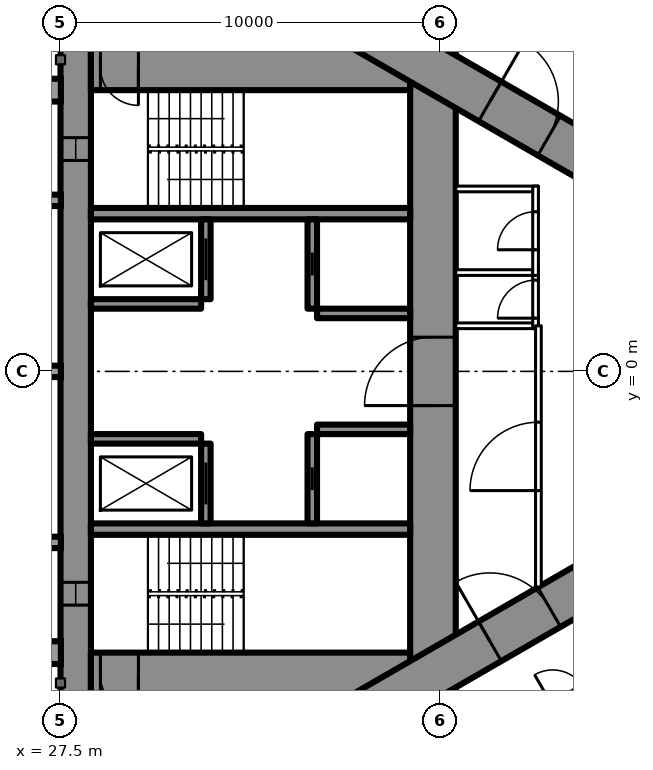
"""IFC4 building model, lengths in metres.
Left out: names, types, materials, properties, quantities, classifications, styles, units other than length and angle.
Written with IfcOpenShell. Run it as: python <this file> out.ifc"""

import sys

from ifc_helpers import new_model, si_unit, direction, frame, frame_2d, origin, place, context, subcontext, project, spatial, rectangle, extrude, element, fill, save


model = new_model("IFC4")
c1 = context("Model", 3, precision=1e-05, world=origin(), true_north=direction((0.0, 1.0)))
c2 = subcontext(c1, "Body", "Model", "MODEL_VIEW")
j1 = project(units=[si_unit("LENGTHUNIT", "METRE"), si_unit("PLANEANGLEUNIT", "RADIAN")], contexts=[c1])
p1 = place(None, origin())
s1 = spatial("IfcSite", under=j1, at=p1, CompositionType="ELEMENT")
p2 = place(p1, origin())
s2 = spatial("IfcBuilding", under=s1, at=p2, CompositionType="ELEMENT")
p3 = place(p2, frame((0.0, 0.0, 28.5)))
s3 = spatial("IfcBuildingStorey", under=s2, at=p3, CompositionType="ELEMENT", Elevation=28.5)
p4 = place(p3, frame((27.9, -8.6, 0.0), z_axis=(0.0, 0.0, 1.0), x_axis=(0.0, 1.0, 0.0)))
e1 = element("IfcWall", 1, at=p4, inside=s3, PredefinedType="SHEAR", context=c2, shape_type="SweptSolid", body=[
    extrude(rectangle(XDim=17.2, YDim=0.8, at=frame_2d((8.6, 0.0))), origin(), (0.0, 0.0, 1.0), 3.5),
])
p5 = place(p4, frame((2.45, 0.0, 0.6)))
e2 = element("IfcOpeningElement", 2, at=p5, cuts=e1, PredefinedType="OPENING", context=c2, shape_type="SweptSolid", body=[
    extrude(rectangle(XDim=0.6, YDim=2.1, at=frame_2d((0.3, 1.05))), frame((0.0, 0.41, 0.0), z_axis=(0.0, -1.0, 0.0), x_axis=(1.0, 0.0, 0.0)), (0.0, 0.0, 1.0), 0.82),
])
p6 = place(p4, frame((14.15, 0.0, 0.6)))
e3 = element("IfcOpeningElement", 3, at=p6, cuts=e1, PredefinedType="OPENING", context=c2, shape_type="SweptSolid", body=[
    extrude(rectangle(XDim=0.6, YDim=2.1, at=frame_2d((0.3, 1.05))), frame((0.0, 0.41, 0.0), z_axis=(0.0, -1.0, 0.0), x_axis=(1.0, 0.0, 0.0)), (0.0, 0.0, 1.0), 0.82),
])
p7 = place(p3, frame((37.3, -8.6, 0.0), z_axis=(0.0, 0.0, 1.0), x_axis=(0.0, 1.0, 0.0)))
e4 = element("IfcWall", 4, at=p7, inside=s3, PredefinedType="SHEAR", context=c2, shape_type="SweptSolid", body=[
    extrude(rectangle(XDim=17.2, YDim=1.2, at=frame_2d((8.6, 0.0))), origin(), (0.0, 0.0, 1.0), 3.5),
])
p8 = place(p7, frame((7.7, 0.0, 0.0)))
e5 = element("IfcOpeningElement", 5, at=p8, cuts=e4, PredefinedType="OPENING", context=c2, shape_type="SweptSolid", body=[
    extrude(rectangle(XDim=1.8, YDim=2.2, at=frame_2d((0.9, 1.1))), frame((0.0, 0.61, 0.0), z_axis=(0.0, -1.0, 0.0), x_axis=(1.0, 0.0, 0.0)), (0.0, 0.0, 1.0), 1.22),
])
p9 = place(p3, frame((28.3, -8.0, 0.0), z_axis=(0.0, 0.0, 1.0), x_axis=(1.0, 0.0, 0.0)))
e6 = element("IfcWall", 6, at=p9, inside=s3, PredefinedType="SHEAR", context=c2, shape_type="SweptSolid", body=[
    extrude(rectangle(XDim=8.4, YDim=1.2, at=frame_2d((4.2, 0.0))), origin(), (0.0, 0.0, 1.0), 3.5),
])
p10 = place(p9, frame((0.25, 0.0, 0.0)))
e7 = element("IfcOpeningElement", 7, at=p10, cuts=e6, PredefinedType="OPENING", context=c2, shape_type="SweptSolid", body=[
    extrude(rectangle(XDim=1.0, YDim=2.2, at=frame_2d((0.5, 1.1))), frame((0.0, 0.61, 0.0), z_axis=(0.0, -1.0, 0.0), x_axis=(1.0, 0.0, 0.0)), (0.0, 0.0, 1.0), 1.22),
])
p11 = place(p3, frame((28.3, 8.0, 0.0), z_axis=(0.0, 0.0, 1.0), x_axis=(1.0, 0.0, 0.0)))
e8 = element("IfcWall", 8, at=p11, inside=s3, PredefinedType="SHEAR", context=c2, shape_type="SweptSolid", body=[
    extrude(rectangle(XDim=8.4, YDim=1.2, at=frame_2d((4.2, 0.0))), origin(), (0.0, 0.0, 1.0), 3.5),
])
p12 = place(p11, frame((0.25, 0.0, 0.0)))
e9 = element("IfcOpeningElement", 9, at=p12, cuts=e8, PredefinedType="OPENING", context=c2, shape_type="SweptSolid", body=[
    extrude(rectangle(XDim=1.0, YDim=2.2, at=frame_2d((0.5, 1.1))), frame((0.0, 0.61, 0.0), z_axis=(0.0, -1.0, 0.0), x_axis=(1.0, 0.0, 0.0)), (0.0, 0.0, 1.0), 1.22),
])
for number, where, z_axis, x_axis in (
    (10, (28.3, -4.15, 0.0), (0.0, 0.0, 1.0), (1.0, 0.0, 0.0)),
    (11, (28.3, 4.15, 0.0), (0.0, 0.0, 1.0), (1.0, 0.0, 0.0)),
):
    element("IfcWall", number, at=place(p3, frame(where, z_axis=z_axis, x_axis=x_axis)), inside=s3, PredefinedType="SHEAR", context=c2, shape_type="SweptSolid", body=[
        extrude(rectangle(XDim=8.4, YDim=0.3, at=frame_2d((4.2, 0.0))), origin(), (0.0, 0.0, 1.0), 3.5),
    ])
p13 = place(p3, frame((31.325, -4.0, 0.0), z_axis=(0.0, 0.0, 1.0), x_axis=(0.0, 1.0, 0.0)))
e12 = element("IfcWall", 12, at=p13, inside=s3, PredefinedType="SHEAR", context=c2, shape_type="SweptSolid", body=[
    extrude(rectangle(XDim=2.1, YDim=0.25, at=frame_2d((1.05, 0.0))), origin(), (0.0, 0.0, 1.0), 3.5),
])
p14 = place(p13, frame((0.5, 0.0, 0.0)))
e13 = element("IfcOpeningElement", 13, at=p14, cuts=e12, PredefinedType="OPENING", context=c2, shape_type="SweptSolid", body=[
    extrude(rectangle(XDim=1.1, YDim=2.2, at=frame_2d((0.55, 1.1))), frame((0.0, 0.135, 0.0), z_axis=(0.0, -1.0, 0.0), x_axis=(1.0, 0.0, 0.0)), (0.0, 0.0, 1.0), 0.27),
])
p15 = place(p3, frame((34.125, -4.0, 0.0), z_axis=(0.0, 0.0, 1.0), x_axis=(0.0, 1.0, 0.0)))
e14 = element("IfcWall", 14, at=p15, inside=s3, PredefinedType="SHEAR", context=c2, shape_type="SweptSolid", body=[
    extrude(rectangle(XDim=2.35, YDim=0.25, at=frame_2d((1.175, 0.0))), origin(), (0.0, 0.0, 1.0), 3.5),
])
p16 = place(p15, frame((0.875, 0.0, 0.0)))
e15 = element("IfcOpeningElement", 15, at=p16, cuts=e14, PredefinedType="OPENING", context=c2, shape_type="SweptSolid", body=[
    extrude(rectangle(XDim=0.6, YDim=2.0, at=frame_2d((0.3, 1.0))), frame((0.0, 0.135, 0.0), z_axis=(0.0, -1.0, 0.0), x_axis=(1.0, 0.0, 0.0)), (0.0, 0.0, 1.0), 0.27),
])
p17 = place(p3, frame((28.3, -1.775, 0.0), z_axis=(0.0, 0.0, 1.0), x_axis=(1.0, 0.0, 0.0)))
e16 = element("IfcWall", 16, at=p17, inside=s3, PredefinedType="SHEAR", context=c2, shape_type="SweptSolid", body=[
    extrude(rectangle(XDim=2.9, YDim=0.25, at=frame_2d((1.45, 0.0))), origin(), (0.0, 0.0, 1.0), 3.5),
])
p18 = place(p3, frame((34.25, -1.525, 0.0), z_axis=(0.0, 0.0, 1.0), x_axis=(1.0, 0.0, 0.0)))
e17 = element("IfcWall", 17, at=p18, inside=s3, PredefinedType="SHEAR", context=c2, shape_type="SweptSolid", body=[
    extrude(rectangle(XDim=2.45, YDim=0.25, at=frame_2d((1.225, 0.0))), origin(), (0.0, 0.0, 1.0), 3.5),
])
p19 = place(p3, frame((31.325, 1.9, 0.0), z_axis=(0.0, 0.0, 1.0), x_axis=(0.0, 1.0, 0.0)))
e18 = element("IfcWall", 18, at=p19, inside=s3, PredefinedType="SHEAR", context=c2, shape_type="SweptSolid", body=[
    extrude(rectangle(XDim=2.1, YDim=0.25, at=frame_2d((1.05, 0.0))), origin(), (0.0, 0.0, 1.0), 3.5),
])
p20 = place(p19, frame((0.5, 0.0, 0.0)))
e19 = element("IfcOpeningElement", 19, at=p20, cuts=e18, PredefinedType="OPENING", context=c2, shape_type="SweptSolid", body=[
    extrude(rectangle(XDim=1.1, YDim=2.2, at=frame_2d((0.55, 1.1))), frame((0.0, 0.135, 0.0), z_axis=(0.0, -1.0, 0.0), x_axis=(1.0, 0.0, 0.0)), (0.0, 0.0, 1.0), 0.27),
])
p21 = place(p3, frame((34.125, 1.65, 0.0), z_axis=(0.0, 0.0, 1.0), x_axis=(0.0, 1.0, 0.0)))
e20 = element("IfcWall", 20, at=p21, inside=s3, PredefinedType="SHEAR", context=c2, shape_type="SweptSolid", body=[
    extrude(rectangle(XDim=2.35, YDim=0.25, at=frame_2d((1.175, 0.0))), origin(), (0.0, 0.0, 1.0), 3.5),
])
p22 = place(p21, frame((0.875, 0.0, 0.0)))
e21 = element("IfcOpeningElement", 21, at=p22, cuts=e20, PredefinedType="OPENING", context=c2, shape_type="SweptSolid", body=[
    extrude(rectangle(XDim=0.6, YDim=2.0, at=frame_2d((0.3, 1.0))), frame((0.0, 0.135, 0.0), z_axis=(0.0, -1.0, 0.0), x_axis=(1.0, 0.0, 0.0)), (0.0, 0.0, 1.0), 0.27),
])
p23 = place(p3, frame((28.3, 1.775, 0.0), z_axis=(0.0, 0.0, 1.0), x_axis=(1.0, 0.0, 0.0)))
e22 = element("IfcWall", 22, at=p23, inside=s3, PredefinedType="SHEAR", context=c2, shape_type="SweptSolid", body=[
    extrude(rectangle(XDim=2.9, YDim=0.25, at=frame_2d((1.45, 0.0))), origin(), (0.0, 0.0, 1.0), 3.5),
])
p24 = place(p3, frame((34.25, 1.525, 0.0), z_axis=(0.0, 0.0, 1.0), x_axis=(1.0, 0.0, 0.0)))
e23 = element("IfcWall", 23, at=p24, inside=s3, PredefinedType="SHEAR", context=c2, shape_type="SweptSolid", body=[
    extrude(rectangle(XDim=2.45, YDim=0.25, at=frame_2d((1.225, 0.0))), origin(), (0.0, 0.0, 1.0), 3.5),
])
p25 = place(p3, frame((27.2, -13.8, 0.0), z_axis=(0.0, 0.0, 1.0), x_axis=(0.866027159892, 0.499996958321, 0.0)))
e24 = element("IfcWall", 24, at=p25, inside=s3, PredefinedType="SHEAR", context=c2, shape_type="SweptSolid", body=[
    extrude(rectangle(XDim=27.947, YDim=1.2, at=frame_2d((13.973, 0.0))), origin(), (0.0, 0.0, 1.0), 3.5),
])
p26 = place(p25, frame((4.6, 0.0, 0.0)))
e25 = element("IfcOpeningElement", 25, at=p26, cuts=e24, PredefinedType="OPENING", context=c2, shape_type="SweptSolid", body=[
    extrude(rectangle(XDim=1.0, YDim=2.2, at=frame_2d((0.5, 1.1))), frame((0.0, 0.61, 0.0), z_axis=(0.0, -1.0, 0.0), x_axis=(1.0, 0.0, 0.0)), (0.0, 0.0, 1.0), 1.22),
])
p27 = place(p25, frame((13.395, 0.0, 0.0)))
e26 = element("IfcOpeningElement", 26, at=p27, cuts=e24, PredefinedType="OPENING", context=c2, shape_type="SweptSolid", body=[
    extrude(rectangle(XDim=1.8, YDim=2.2, at=frame_2d((0.9, 1.1))), frame((0.0, 0.61, 0.0), z_axis=(0.0, -1.0, 0.0), x_axis=(1.0, 0.0, 0.0)), (0.0, 0.0, 1.0), 1.22),
])
p28 = place(p3, frame((27.2, 13.8, 0.0), z_axis=(0.0, 0.0, 1.0), x_axis=(0.866024515034, -0.500001539357, 0.0)))
e27 = element("IfcWall", 27, at=p28, inside=s3, PredefinedType="SHEAR", context=c2, shape_type="SweptSolid", body=[
    extrude(rectangle(XDim=26.907, YDim=1.2, at=frame_2d((13.454, 0.0))), origin(), (0.0, 0.0, 1.0), 3.5),
])
p29 = place(p28, frame((4.6, 0.0, 0.0)))
e28 = element("IfcOpeningElement", 28, at=p29, cuts=e27, PredefinedType="OPENING", context=c2, shape_type="SweptSolid", body=[
    extrude(rectangle(XDim=1.0, YDim=2.2, at=frame_2d((0.5, 1.1))), frame((0.0, 0.61, 0.0), z_axis=(0.0, -1.0, 0.0), x_axis=(1.0, 0.0, 0.0)), (0.0, 0.0, 1.0), 1.22),
])
p30 = place(p28, frame((13.395, 0.0, 0.0)))
e29 = element("IfcOpeningElement", 29, at=p30, cuts=e27, PredefinedType="OPENING", context=c2, shape_type="SweptSolid", body=[
    extrude(rectangle(XDim=1.8, YDim=2.2, at=frame_2d((0.9, 1.1))), frame((0.0, 0.61, 0.0), z_axis=(0.0, -1.0, 0.0), x_axis=(1.0, 0.0, 0.0)), (0.0, 0.0, 1.0), 1.22),
])
p31 = place(p3, frame((37.96, -10.243, 0.0), z_axis=(0.0, 0.0, 1.0), x_axis=(0.866026429433, 0.499998223521, 0.0)))
e30 = element("IfcWall", 30, at=p31, inside=s3, PredefinedType="PARTITIONING", context=c2, shape_type="SweptSolid", body=[
    extrude(rectangle(XDim=20.487, YDim=0.2, at=frame_2d((10.243, 0.0))), origin(), (0.0, 0.0, 1.0), 3.25),
])
p32 = place(p31, frame((4.575, 0.0, 0.0)))
e31 = element("IfcOpeningElement", 31, at=p32, cuts=e30, PredefinedType="OPENING", context=c2, shape_type="SweptSolid", body=[
    extrude(rectangle(XDim=0.95, YDim=2.2, at=frame_2d((0.475, 1.1))), frame((0.0, 0.11, 0.0), z_axis=(0.0, -1.0, 0.0), x_axis=(1.0, 0.0, 0.0)), (0.0, 0.0, 1.0), 0.22),
])
p33 = place(p31, frame((9.199, 0.0, 0.0)))
e32 = element("IfcOpeningElement", 32, at=p33, cuts=e30, PredefinedType="OPENING", context=c2, shape_type="SweptSolid", body=[
    extrude(rectangle(XDim=0.95, YDim=2.2, at=frame_2d((0.475, 1.1))), frame((0.0, 0.11, 0.0), z_axis=(0.0, -1.0, 0.0), x_axis=(1.0, 0.0, 0.0)), (0.0, 0.0, 1.0), 0.22),
])
p34 = place(p31, frame((15.599, 0.0, 0.0)))
e33 = element("IfcOpeningElement", 33, at=p34, cuts=e30, PredefinedType="OPENING", context=c2, shape_type="SweptSolid", body=[
    extrude(rectangle(XDim=0.95, YDim=2.2, at=frame_2d((0.475, 1.1))), frame((0.0, 0.11, 0.0), z_axis=(0.0, -1.0, 0.0), x_axis=(1.0, 0.0, 0.0)), (0.0, 0.0, 1.0), 0.22),
])
p35 = place(p31, frame((2.875, 0.0, 0.0)))
e34 = element("IfcOpeningElement", 34, at=p35, cuts=e30, PredefinedType="OPENING", context=c2, shape_type="SweptSolid", body=[
    extrude(rectangle(XDim=0.95, YDim=2.2, at=frame_2d((0.475, 1.1))), frame((0.0, 0.11, 0.0), z_axis=(0.0, -1.0, 0.0), x_axis=(1.0, 0.0, 0.0)), (0.0, 0.0, 1.0), 0.22),
])
for number, where, z_axis, x_axis in (
    (35, (37.9, 1.2, 0.0), (0.0, 0.0, 1.0), (1.0, 0.0, 0.0)),
    (36, (37.9, 2.6, 0.0), (0.0, 0.0, 1.0), (1.0, 0.0, 0.0)),
    (37, (37.9, 4.8, 0.0), (0.0, 0.0, 1.0), (1.0, 0.0, 0.0)),
):
    element("IfcWall", number, at=place(p3, frame(where, z_axis=z_axis, x_axis=x_axis)), inside=s3, PredefinedType="PARTITIONING", context=c2, shape_type="SweptSolid", body=[
        extrude(rectangle(XDim=2.175, YDim=0.15, at=frame_2d((1.087, 0.0))), origin(), (0.0, 0.0, 1.0), 3.25),
    ])
p36 = place(p3, frame((40.0, 1.125, 0.0), z_axis=(0.0, 0.0, 1.0), x_axis=(0.0, 1.0, 0.0)))
e38 = element("IfcWall", 38, at=p36, inside=s3, PredefinedType="PARTITIONING", context=c2, shape_type="SweptSolid", body=[
    extrude(rectangle(XDim=1.55, YDim=0.15, at=frame_2d((0.775, 0.0))), origin(), (0.0, 0.0, 1.0), 3.25),
])
p37 = place(p36, frame((0.275, 0.0, 0.0)))
e39 = element("IfcOpeningElement", 39, at=p37, cuts=e38, PredefinedType="OPENING", context=c2, shape_type="SweptSolid", body=[
    extrude(rectangle(XDim=1.0, YDim=2.2, at=frame_2d((0.5, 1.1))), frame((0.0, 0.085, 0.0), z_axis=(0.0, -1.0, 0.0), x_axis=(1.0, 0.0, 0.0)), (0.0, 0.0, 1.0), 0.17),
])
p38 = place(p3, frame((40.0, 2.525, 0.0), z_axis=(0.0, 0.0, 1.0), x_axis=(0.0, 1.0, 0.0)))
e40 = element("IfcWall", 40, at=p38, inside=s3, PredefinedType="PARTITIONING", context=c2, shape_type="SweptSolid", body=[
    extrude(rectangle(XDim=2.35, YDim=0.15, at=frame_2d((1.175, 0.0))), origin(), (0.0, 0.0, 1.0), 3.25),
])
p39 = place(p38, frame((0.675, 0.0, 0.0)))
e41 = element("IfcOpeningElement", 41, at=p39, cuts=e40, PredefinedType="OPENING", context=c2, shape_type="SweptSolid", body=[
    extrude(rectangle(XDim=1.0, YDim=2.2, at=frame_2d((0.5, 1.1))), frame((0.0, 0.085, 0.0), z_axis=(0.0, -1.0, 0.0), x_axis=(1.0, 0.0, 0.0)), (0.0, 0.0, 1.0), 0.17),
])
p40 = place(p3, frame((40.075, -5.674, 0.0), z_axis=(0.0, 0.0, 1.0), x_axis=(0.0, 1.0, 0.0)))
e42 = element("IfcWall", 42, at=p40, inside=s3, PredefinedType="PARTITIONING", context=c2, shape_type="SweptSolid", body=[
    extrude(rectangle(XDim=6.874, YDim=0.15, at=frame_2d((3.437, 0.0))), origin(), (0.0, 0.0, 1.0), 3.25),
])
p41 = place(p40, frame((2.537, 0.0, 0.0)))
e43 = element("IfcOpeningElement", 43, at=p41, cuts=e42, PredefinedType="OPENING", context=c2, shape_type="SweptSolid", body=[
    extrude(rectangle(XDim=1.8, YDim=2.2, at=frame_2d((0.9, 1.1))), frame((0.0, 0.085, 0.0), z_axis=(0.0, -1.0, 0.0), x_axis=(1.0, 0.0, 0.0)), (0.0, 0.0, 1.0), 0.17),
])
p42 = place(p35, origin())
e44 = element("IfcDoor", 44, at=p42, inside=s3, OperationType="SINGLE_SWING_LEFT", PredefinedType="DOOR", context=c2, shape_type="SweptSolid", body=[
    extrude(rectangle(XDim=0.95, YDim=2.2, at=frame_2d((0.475, 1.1))), frame((0.0, 0.025, 0.0), z_axis=(0.0, -1.0, 0.0), x_axis=(1.0, 0.0, 0.0)), (0.0, 0.0, 1.0), 0.05),
])
fill(e34, e44)
p43 = place(p37, origin())
e45 = element("IfcDoor", 45, at=p43, inside=s3, OperationType="SINGLE_SWING_LEFT", PredefinedType="DOOR", context=c2, shape_type="SweptSolid", body=[
    extrude(rectangle(XDim=1.0, YDim=2.2, at=frame_2d((0.5, 1.1))), frame((0.0, 0.025, 0.0), z_axis=(0.0, -1.0, 0.0), x_axis=(1.0, 0.0, 0.0)), (0.0, 0.0, 1.0), 0.05),
])
fill(e39, e45)
p44 = place(p39, origin())
e46 = element("IfcDoor", 46, at=p44, inside=s3, OperationType="SINGLE_SWING_LEFT", PredefinedType="DOOR", context=c2, shape_type="SweptSolid", body=[
    extrude(rectangle(XDim=1.0, YDim=2.2, at=frame_2d((0.5, 1.1))), frame((0.0, 0.025, 0.0), z_axis=(0.0, -1.0, 0.0), x_axis=(1.0, 0.0, 0.0)), (0.0, 0.0, 1.0), 0.05),
])
fill(e41, e46)
p45 = place(p41, origin())
e47 = element("IfcDoor", 47, at=p45, inside=s3, OperationType="DOUBLE_DOOR_SINGLE_SWING", PredefinedType="DOOR", context=c2, shape_type="SweptSolid", body=[
    extrude(rectangle(XDim=1.8, YDim=2.2, at=frame_2d((0.9, 1.1))), frame((0.0, 0.025, 0.0), z_axis=(0.0, -1.0, 0.0), x_axis=(1.0, 0.0, 0.0)), (0.0, 0.0, 1.0), 0.05),
])
fill(e43, e47)
p46 = place(p27, origin())
e48 = element("IfcDoor", 48, at=p46, inside=s3, OperationType="DOUBLE_DOOR_SINGLE_SWING", PredefinedType="DOOR", context=c2, shape_type="SweptSolid", body=[
    extrude(rectangle(XDim=1.8, YDim=2.2, at=frame_2d((0.9, 1.1))), frame((0.0, 0.025, 0.0), z_axis=(0.0, -1.0, 0.0), x_axis=(1.0, 0.0, 0.0)), (0.0, 0.0, 1.0), 0.05),
])
fill(e26, e48)
p47 = place(p30, origin())
e49 = element("IfcDoor", 49, at=p47, inside=s3, OperationType="DOUBLE_DOOR_SINGLE_SWING", PredefinedType="DOOR", context=c2, shape_type="SweptSolid", body=[
    extrude(rectangle(XDim=1.8, YDim=2.2, at=frame_2d((0.9, 1.1))), frame((0.0, 0.025, 0.0), z_axis=(0.0, -1.0, 0.0), x_axis=(1.0, 0.0, 0.0)), (0.0, 0.0, 1.0), 0.05),
])
fill(e29, e49)
p48 = place(p8, origin())
e50 = element("IfcDoor", 50, at=p48, inside=s3, OperationType="DOUBLE_DOOR_SINGLE_SWING", PredefinedType="DOOR", context=c2, shape_type="SweptSolid", body=[
    extrude(rectangle(XDim=1.8, YDim=2.2, at=frame_2d((0.9, 1.1))), frame((0.0, 0.025, 0.0), z_axis=(0.0, -1.0, 0.0), x_axis=(1.0, 0.0, 0.0)), (0.0, 0.0, 1.0), 0.05),
])
fill(e5, e50)
p49 = place(p10, origin())
e51 = element("IfcDoor", 51, at=p49, inside=s3, OperationType="SINGLE_SWING_RIGHT", PredefinedType="DOOR", context=c2, shape_type="SweptSolid", body=[
    extrude(rectangle(XDim=1.0, YDim=2.2, at=frame_2d((0.5, 1.1))), frame((0.0, 0.025, 0.0), z_axis=(0.0, -1.0, 0.0), x_axis=(1.0, 0.0, 0.0)), (0.0, 0.0, 1.0), 0.05),
])
fill(e7, e51)
p50 = place(p12, origin())
e52 = element("IfcDoor", 52, at=p50, inside=s3, OperationType="SINGLE_SWING_RIGHT", PredefinedType="DOOR", context=c2, shape_type="SweptSolid", body=[
    extrude(rectangle(XDim=1.0, YDim=2.2, at=frame_2d((0.5, 1.1))), frame((0.0, 0.025, 0.0), z_axis=(0.0, -1.0, 0.0), x_axis=(1.0, 0.0, 0.0)), (0.0, 0.0, 1.0), 0.05),
])
fill(e9, e52)
p51 = place(p14, origin())
e53 = element("IfcDoor", 53, at=p51, inside=s3, OperationType="SLIDING_TO_LEFT", PredefinedType="USERDEFINED", context=c2, shape_type="SweptSolid", body=[
    extrude(rectangle(XDim=1.1, YDim=2.2, at=frame_2d((0.55, 1.1))), frame((0.0, 0.025, 0.0), z_axis=(0.0, -1.0, 0.0), x_axis=(1.0, 0.0, 0.0)), (0.0, 0.0, 1.0), 0.05),
])
fill(e13, e53)
p52 = place(p20, origin())
e54 = element("IfcDoor", 54, at=p52, inside=s3, OperationType="SLIDING_TO_LEFT", PredefinedType="USERDEFINED", context=c2, shape_type="SweptSolid", body=[
    extrude(rectangle(XDim=1.1, YDim=2.2, at=frame_2d((0.55, 1.1))), frame((0.0, 0.025, 0.0), z_axis=(0.0, -1.0, 0.0), x_axis=(1.0, 0.0, 0.0)), (0.0, 0.0, 1.0), 0.05),
])
fill(e19, e54)
p53 = place(p16, origin())
e55 = element("IfcDoor", 55, at=p53, inside=s3, OperationType="SLIDING_TO_LEFT", PredefinedType="DOOR", context=c2, shape_type="SweptSolid", body=[
    extrude(rectangle(XDim=0.6, YDim=2.0, at=frame_2d((0.3, 1.0))), frame((0.0, 0.025, 0.0), z_axis=(0.0, -1.0, 0.0), x_axis=(1.0, 0.0, 0.0)), (0.0, 0.0, 1.0), 0.05),
])
fill(e15, e55)
p54 = place(p22, origin())
e56 = element("IfcDoor", 56, at=p54, inside=s3, OperationType="SLIDING_TO_LEFT", PredefinedType="DOOR", context=c2, shape_type="SweptSolid", body=[
    extrude(rectangle(XDim=0.6, YDim=2.0, at=frame_2d((0.3, 1.0))), frame((0.0, 0.025, 0.0), z_axis=(0.0, -1.0, 0.0), x_axis=(1.0, 0.0, 0.0)), (0.0, 0.0, 1.0), 0.05),
])
fill(e21, e56)
p55 = place(p5, origin())
e57 = element("IfcWindow", 57, at=p55, inside=s3, PartitioningType="SINGLE_PANEL", PredefinedType="WINDOW", context=c2, shape_type="SweptSolid", body=[
    extrude(rectangle(XDim=0.6, YDim=2.1, at=frame_2d((0.3, 1.05))), frame((0.0, 0.03, 0.0), z_axis=(0.0, -1.0, 0.0), x_axis=(1.0, 0.0, 0.0)), (0.0, 0.0, 1.0), 0.06),
])
fill(e2, e57)
p56 = place(p6, origin())
e58 = element("IfcWindow", 58, at=p56, inside=s3, PartitioningType="SINGLE_PANEL", PredefinedType="WINDOW", context=c2, shape_type="SweptSolid", body=[
    extrude(rectangle(XDim=0.6, YDim=2.1, at=frame_2d((0.3, 1.05))), frame((0.0, 0.03, 0.0), z_axis=(0.0, -1.0, 0.0), x_axis=(1.0, 0.0, 0.0)), (0.0, 0.0, 1.0), 0.06),
])
fill(e3, e58)
save(model, sys.argv[1])
